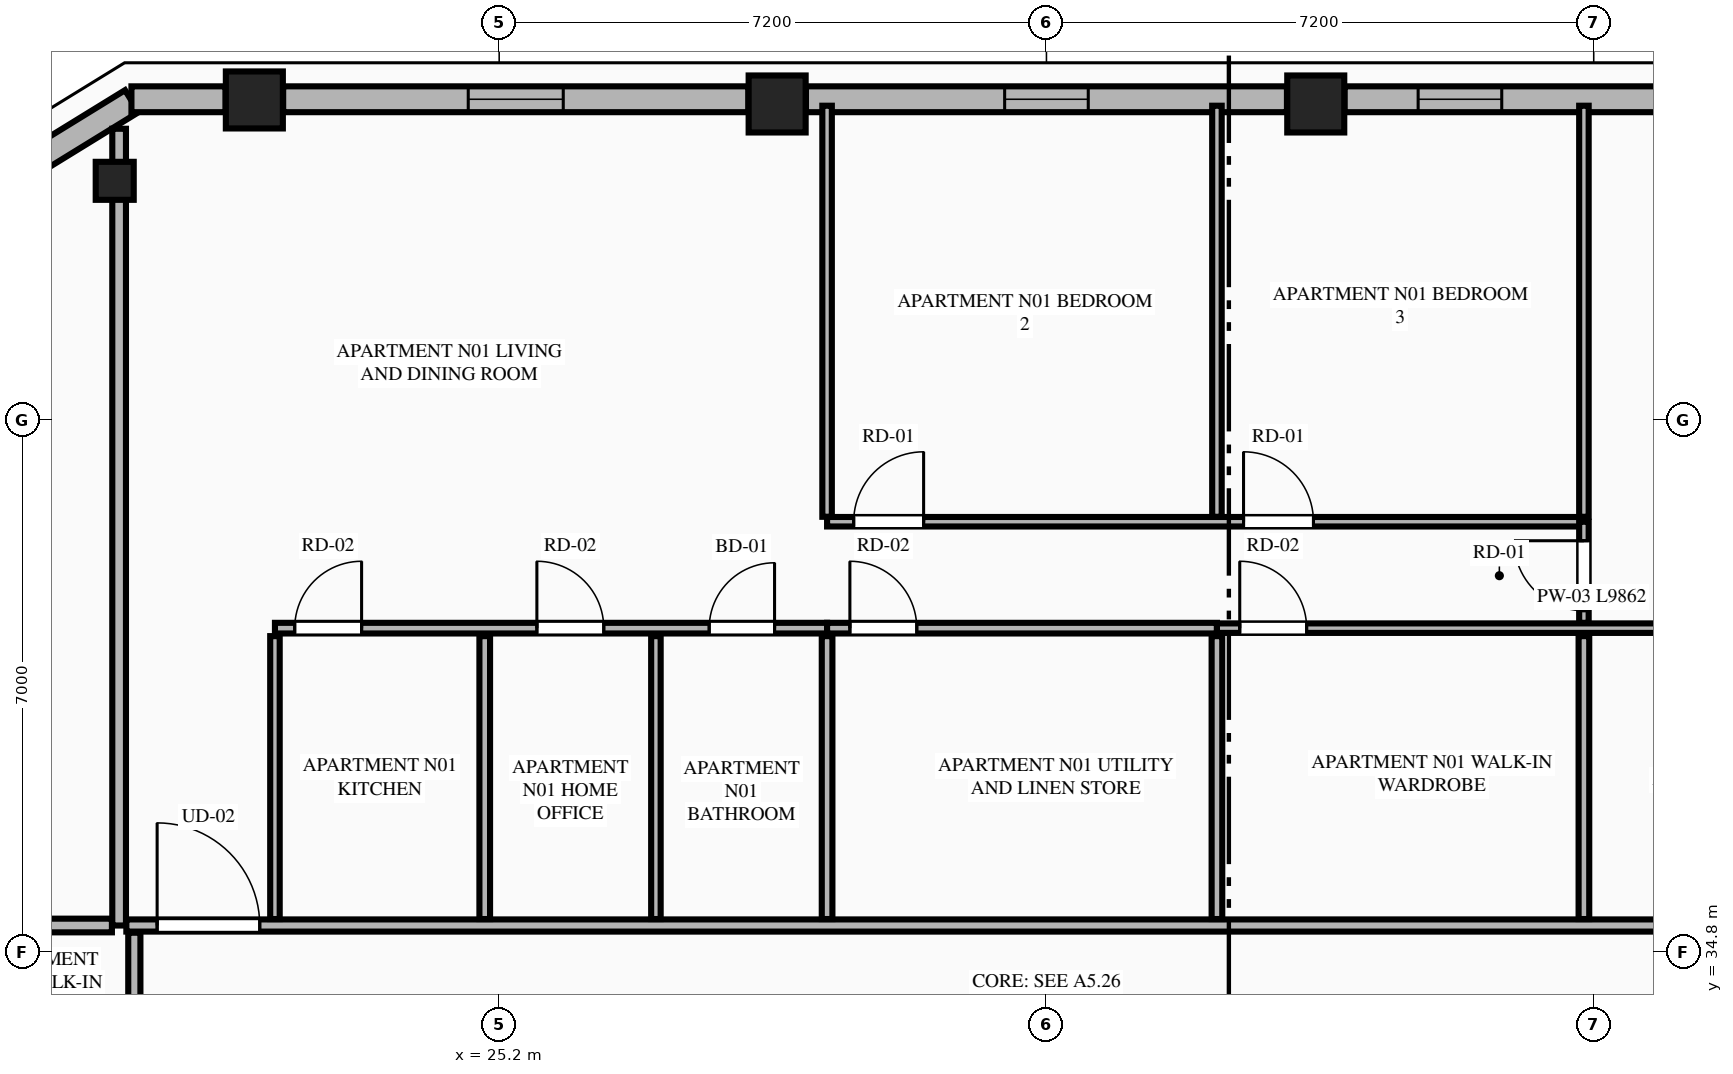
"""IFC4 building model, lengths in metres.
Left out: names, types, materials, properties, quantities, classifications, styles, units other than length and angle.
Written with IfcOpenShell. Run it as: python <this file> out.ifc"""

import sys

from ifc_helpers import new_model, si_unit, direction, frame, frame_2d, origin, origin_2d, place, context, subcontext, project, spatial, rectangle, extrude, element, fill, save


model = new_model("IFC4")
c1 = context("Model", 3, precision=1e-05, world=origin(), true_north=direction((0.0, 1.0)))
c2 = subcontext(c1, "Body", "Model", "MODEL_VIEW")
j1 = project(units=[si_unit("LENGTHUNIT", "METRE"), si_unit("PLANEANGLEUNIT", "RADIAN")], contexts=[c1])
p1 = place(None, origin())
s1 = spatial("IfcSite", under=j1, at=p1, CompositionType="ELEMENT")
p2 = place(p1, origin())
s2 = spatial("IfcBuilding", under=s1, at=p2, CompositionType="ELEMENT")
p3 = place(p2, frame((0.0, 0.0, 210.95)))
s3 = spatial("IfcBuildingStorey", under=s2, at=p3, CompositionType="ELEMENT", Elevation=210.95)
for number, where, z_axis, x_axis in (
    (1, (35.943, 45.958, 0.0), (0.0, 0.0, 1.0), (1.0, 0.0, 0.0)),
    (2, (28.857, 45.958, 0.0), (0.0, 0.0, 1.0), (1.0, 0.0, 0.0)),
    (3, (21.979, 46.011, 0.0), (0.0, 0.0, 1.0), (1.0, 0.0, 0.0)),
):
    element("IfcColumn", number, at=place(p3, frame(where, z_axis=z_axis, x_axis=x_axis)), inside=s3, PredefinedType="COLUMN", context=c2, shape_type="SweptSolid", body=[
        extrude(rectangle(XDim=0.75, YDim=0.75, at=origin_2d()), origin(), (0.0, 0.0, 1.0), 3.55),
    ])
p4 = place(p3, frame((20.142, 44.947, 0.0), z_axis=(0.0, 0.0, 1.0), x_axis=(-0.865230187018, -0.501374833306, 0.0)))
e4 = element("IfcColumn", 4, at=p4, inside=s3, PredefinedType="PILASTER", context=c2, shape_type="SweptSolid", body=[
    extrude(rectangle(XDim=0.5, YDim=0.35, at=origin_2d()), origin(), (0.0, 0.0, 1.0), 3.55),
])
p5 = place(p3, frame((20.367, 45.995, 0.0), z_axis=(0.0, 0.0, 1.0), x_axis=(-0.851713271379, -0.524008113828, 0.0)))
e5 = element("IfcWall", 5, at=p5, inside=s3, PredefinedType="STANDARD", context=c2, shape_type="SweptSolid", body=[
    extrude(rectangle(XDim=1.678, YDim=0.34, at=frame_2d((0.839, 0.0))), origin(), (0.0, 0.0, 1.0), 3.35),
])
p6 = place(p3, frame((42.442, 46.02, 0.0), z_axis=(0.0, 0.0, 1.0), x_axis=(-1.0, 0.0, 0.0)))
e6 = element("IfcWall", 6, at=p6, inside=s3, PredefinedType="STANDARD", context=c2, shape_type="SweptSolid", body=[
    extrude(rectangle(XDim=6.12, YDim=0.34, at=frame_2d((3.06, 0.0))), origin(), (0.0, 0.0, 1.0), 2.883),
])
p7 = place(p6, frame((0.879, 0.0, 0.75)))
e7 = element("IfcOpeningElement", 7, at=p7, cuts=e6, PredefinedType="OPENING", context=c2, shape_type="SweptSolid", body=[
    extrude(rectangle(XDim=1.1, YDim=1.983, at=frame_2d((0.55, 0.991))), frame((0.0, 0.18, 0.0), z_axis=(0.0, -1.0, 0.0), x_axis=(1.0, 0.0, 0.0)), (0.0, 0.0, 1.0), 0.36),
])
p8 = place(p6, frame((4.052, 0.0, 0.75)))
e8 = element("IfcOpeningElement", 8, at=p8, cuts=e6, PredefinedType="OPENING", context=c2, shape_type="SweptSolid", body=[
    extrude(rectangle(XDim=1.1, YDim=1.983, at=frame_2d((0.55, 0.991))), frame((0.0, 0.18, 0.0), z_axis=(0.0, -1.0, 0.0), x_axis=(1.0, 0.0, 0.0)), (0.0, 0.0, 1.0), 0.36),
])
p9 = place(p3, frame((35.564, 46.02, 0.0), z_axis=(0.0, 0.0, 1.0), x_axis=(-1.0, 0.0, 0.0)))
e9 = element("IfcWall", 9, at=p9, inside=s3, PredefinedType="STANDARD", context=c2, shape_type="SweptSolid", body=[
    extrude(rectangle(XDim=6.328, YDim=0.34, at=frame_2d((3.164, 0.0))), origin(), (0.0, 0.0, 1.0), 2.883),
])
p10 = place(p9, frame((2.614, 0.0, 0.75)))
e10 = element("IfcOpeningElement", 10, at=p10, cuts=e9, PredefinedType="OPENING", context=c2, shape_type="SweptSolid", body=[
    extrude(rectangle(XDim=1.1, YDim=1.983, at=frame_2d((0.55, 0.991))), frame((0.0, 0.18, 0.0), z_axis=(0.0, -1.0, 0.0), x_axis=(1.0, 0.0, 0.0)), (0.0, 0.0, 1.0), 0.36),
])
p11 = place(p3, frame((28.478, 46.02, 0.0), z_axis=(0.0, 0.0, 1.0), x_axis=(-1.0, 0.0, 0.0)))
e11 = element("IfcWall", 11, at=p11, inside=s3, PredefinedType="STANDARD", context=c2, shape_type="SweptSolid", body=[
    extrude(rectangle(XDim=6.12, YDim=0.34, at=frame_2d((3.06, 0.0))), origin(), (0.0, 0.0, 1.0), 2.883),
])
p12 = place(p11, frame((2.435, 0.0, 0.75)))
e12 = element("IfcOpeningElement", 12, at=p12, cuts=e11, PredefinedType="OPENING", context=c2, shape_type="SweptSolid", body=[
    extrude(rectangle(XDim=1.25, YDim=1.95, at=frame_2d((0.625, 0.975))), frame((0.0, 0.18, 0.0), z_axis=(0.0, -1.0, 0.0), x_axis=(1.0, 0.0, 0.0)), (0.0, 0.0, 1.0), 0.36),
])
p13 = place(p3, frame((21.6, 46.02, 0.0), z_axis=(0.0, 0.0, 1.0), x_axis=(-1.0, 0.0, 0.0)))
e13 = element("IfcWall", 13, at=p13, inside=s3, PredefinedType="STANDARD", context=c2, shape_type="SweptSolid", body=[
    extrude(rectangle(XDim=1.238, YDim=0.34, at=frame_2d((0.619, 0.0))), origin(), (0.0, 0.0, 1.0), 3.35),
])
p14 = place(p3, frame((20.2, 35.15, 0.0), z_axis=(0.0, 0.0, 1.0), x_axis=(0.0, 1.0, 0.0)))
e14 = element("IfcWall", 14, at=p14, inside=s3, PredefinedType="PARTITIONING", context=c2, shape_type="SweptSolid", body=[
    extrude(rectangle(XDim=10.482, YDim=0.18, at=frame_2d((5.241, 0.0))), origin(), (0.0, 0.0, 1.0), 3.35),
])
p15 = place(p3, frame((20.295, 35.15, 0.0), z_axis=(0.0, 0.0, 1.0), x_axis=(1.0, 0.0, 0.0)))
e15 = element("IfcWall", 15, at=p15, inside=s3, PredefinedType="PARTITIONING", context=c2, shape_type="SweptSolid", body=[
    extrude(rectangle(XDim=24.21, YDim=0.16, at=frame_2d((12.105, 0.0))), origin(), (0.0, 0.0, 1.0), 3.35),
])
p16 = place(p15, frame((0.405, 0.0, 0.0)))
e16 = element("IfcOpeningElement", 16, at=p16, cuts=e15, PredefinedType="OPENING", context=c2, shape_type="SweptSolid", body=[
    extrude(rectangle(XDim=1.35, YDim=2.35, at=frame_2d((0.675, 1.175))), frame((0.0, 0.09, 0.0), z_axis=(0.0, -1.0, 0.0), x_axis=(1.0, 0.0, 0.0)), (0.0, 0.0, 1.0), 0.18),
])
p17 = place(p3, frame((22.25, 35.235, 0.0), z_axis=(0.0, 0.0, 1.0), x_axis=(0.0, 1.0, 0.0)))
e17 = element("IfcWall", 17, at=p17, inside=s3, PredefinedType="PARTITIONING", context=c2, shape_type="SweptSolid", body=[
    extrude(rectangle(XDim=3.722, YDim=0.125, at=frame_2d((1.861, 0.0))), origin(), (0.0, 0.0, 1.0), 2.807),
])
p18 = place(p3, frame((22.25, 39.062, 0.0), z_axis=(0.0, 0.0, 1.0), x_axis=(1.0, 0.0, 0.0)))
e18 = element("IfcWall", 18, at=p18, inside=s3, PredefinedType="PLUMBINGWALL", context=c2, shape_type="SweptSolid", body=[
    extrude(rectangle(XDim=7.264, YDim=0.14, at=frame_2d((3.632, 0.0))), origin(), (0.0, 0.0, 1.0), 3.35),
])
p19 = place(p18, frame((5.713, 0.0, 0.0)))
e19 = element("IfcOpeningElement", 19, at=p19, cuts=e18, PredefinedType="OPENING", context=c2, shape_type="SweptSolid", body=[
    extrude(rectangle(XDim=0.86, YDim=2.1, at=frame_2d((0.43, 1.05))), frame((0.0, 0.08, 0.0), z_axis=(0.0, -1.0, 0.0), x_axis=(1.0, 0.0, 0.0)), (0.0, 0.0, 1.0), 0.16),
])
p20 = place(p18, frame((0.26, 0.0, 0.0)))
e20 = element("IfcOpeningElement", 20, at=p20, cuts=e18, PredefinedType="OPENING", context=c2, shape_type="SweptSolid", body=[
    extrude(rectangle(XDim=0.88, YDim=2.15, at=frame_2d((0.44, 1.075))), frame((0.0, 0.08, 0.0), z_axis=(0.0, -1.0, 0.0), x_axis=(1.0, 0.0, 0.0)), (0.0, 0.0, 1.0), 0.16),
])
p21 = place(p18, frame((3.446, 0.0, 0.0)))
e21 = element("IfcOpeningElement", 21, at=p21, cuts=e18, PredefinedType="OPENING", context=c2, shape_type="SweptSolid", body=[
    extrude(rectangle(XDim=0.88, YDim=2.15, at=frame_2d((0.44, 1.075))), frame((0.0, 0.08, 0.0), z_axis=(0.0, -1.0, 0.0), x_axis=(1.0, 0.0, 0.0)), (0.0, 0.0, 1.0), 0.16),
])
p22 = place(p3, frame((29.514, 39.062, 0.0), z_axis=(0.0, 0.0, 1.0), x_axis=(1.0, 0.0, 0.0)))
e22 = element("IfcWall", 22, at=p22, inside=s3, PredefinedType="PLUMBINGWALL", context=c2, shape_type="SweptSolid", body=[
    extrude(rectangle(XDim=5.129, YDim=0.14, at=frame_2d((2.564, 0.0))), origin(), (0.0, 0.0, 1.0), 3.35),
])
p23 = place(p22, frame((0.3, 0.0, 0.0)))
e23 = element("IfcOpeningElement", 23, at=p23, cuts=e22, PredefinedType="OPENING", context=c2, shape_type="SweptSolid", body=[
    extrude(rectangle(XDim=0.88, YDim=2.15, at=frame_2d((0.44, 1.075))), frame((0.0, 0.08, 0.0), z_axis=(0.0, -1.0, 0.0), x_axis=(1.0, 0.0, 0.0)), (0.0, 0.0, 1.0), 0.16),
])
p24 = place(p3, frame((34.643, 39.062, 0.0), z_axis=(0.0, 0.0, 1.0), x_axis=(1.0, 0.0, 0.0)))
e24 = element("IfcWall", 24, at=p24, inside=s3, PredefinedType="PARTITIONING", context=c2, shape_type="SweptSolid", body=[
    extrude(rectangle(XDim=9.862, YDim=0.125, at=frame_2d((4.931, 0.0))), origin(), (0.0, 0.0, 1.0), 3.35),
])
p25 = place(p24, frame((6.92, 0.0, 0.0)))
e25 = element("IfcOpeningElement", 25, at=p25, cuts=e24, PredefinedType="OPENING", context=c2, shape_type="SweptSolid", body=[
    extrude(rectangle(XDim=0.86, YDim=2.1, at=frame_2d((0.43, 1.05))), frame((0.0, 0.073, 0.0), z_axis=(0.0, -1.0, 0.0), x_axis=(1.0, 0.0, 0.0)), (0.0, 0.0, 1.0), 0.145),
])
p26 = place(p24, frame((0.3, 0.0, 0.0)))
e26 = element("IfcOpeningElement", 26, at=p26, cuts=e24, PredefinedType="OPENING", context=c2, shape_type="SweptSolid", body=[
    extrude(rectangle(XDim=0.88, YDim=2.15, at=frame_2d((0.44, 1.075))), frame((0.0, 0.073, 0.0), z_axis=(0.0, -1.0, 0.0), x_axis=(1.0, 0.0, 0.0)), (0.0, 0.0, 1.0), 0.145),
])
p27 = place(p3, frame((25.01, 35.235, 0.0), z_axis=(0.0, 0.0, 1.0), x_axis=(0.0, 1.0, 0.0)))
e27 = element("IfcWall", 27, at=p27, inside=s3, PredefinedType="PLUMBINGWALL", context=c2, shape_type="SweptSolid", body=[
    extrude(rectangle(XDim=3.722, YDim=0.14, at=frame_2d((1.861, 0.0))), origin(), (0.0, 0.0, 1.0), 3.35),
])
p28 = place(p3, frame((27.262, 35.235, 0.0), z_axis=(0.0, 0.0, 1.0), x_axis=(0.0, 1.0, 0.0)))
e28 = element("IfcWall", 28, at=p28, inside=s3, PredefinedType="PARTITIONING", context=c2, shape_type="SweptSolid", body=[
    extrude(rectangle(XDim=3.722, YDim=0.125, at=frame_2d((1.861, 0.0))), origin(), (0.0, 0.0, 1.0), 3.35),
])
p29 = place(p3, frame((29.514, 40.527, 0.0), z_axis=(0.0, 0.0, 1.0), x_axis=(0.0, 1.0, 0.0)))
e29 = element("IfcWall", 29, at=p29, inside=s3, PredefinedType="PARTITIONING", context=c2, shape_type="SweptSolid", body=[
    extrude(rectangle(XDim=5.408, YDim=0.125, at=frame_2d((2.704, 0.0))), origin(), (0.0, 0.0, 1.0), 3.35),
])
p30 = place(p3, frame((29.514, 40.462, 0.0), z_axis=(0.0, 0.0, 1.0), x_axis=(1.0, 0.0, 0.0)))
e30 = element("IfcWall", 30, at=p30, inside=s3, PredefinedType="PARTITIONING", context=c2, shape_type="SweptSolid", body=[
    extrude(rectangle(XDim=9.957, YDim=0.125, at=frame_2d((4.979, 0.0))), origin(), (0.0, 0.0, 1.0), 3.35),
])
p31 = place(p30, frame((0.35, 0.0, 0.0)))
e31 = element("IfcOpeningElement", 31, at=p31, cuts=e30, PredefinedType="OPENING", context=c2, shape_type="SweptSolid", body=[
    extrude(rectangle(XDim=0.92, YDim=2.15, at=frame_2d((0.46, 1.075))), frame((0.0, 0.073, 0.0), z_axis=(0.0, -1.0, 0.0), x_axis=(1.0, 0.0, 0.0)), (0.0, 0.0, 1.0), 0.145),
])
p32 = place(p30, frame((5.479, 0.0, 0.0)))
e32 = element("IfcOpeningElement", 32, at=p32, cuts=e30, PredefinedType="OPENING", context=c2, shape_type="SweptSolid", body=[
    extrude(rectangle(XDim=0.92, YDim=2.15, at=frame_2d((0.46, 1.075))), frame((0.0, 0.073, 0.0), z_axis=(0.0, -1.0, 0.0), x_axis=(1.0, 0.0, 0.0)), (0.0, 0.0, 1.0), 0.145),
])
p33 = place(p3, frame((39.471, 39.132, 0.0), z_axis=(0.0, 0.0, 1.0), x_axis=(0.0, 1.0, 0.0)))
e33 = element("IfcWall", 33, at=p33, inside=s3, PredefinedType="PARTITIONING", context=c2, shape_type="SweptSolid", body=[
    extrude(rectangle(XDim=1.33, YDim=0.125, at=frame_2d((0.665, 0.0))), origin(), (0.0, 0.0, 1.0), 3.35),
])
p34 = place(p33, frame((0.16, 0.0, 0.0)))
e34 = element("IfcOpeningElement", 34, at=p34, cuts=e33, PredefinedType="OPENING", context=c2, shape_type="SweptSolid", body=[
    extrude(rectangle(XDim=0.92, YDim=2.15, at=frame_2d((0.46, 1.075))), frame((0.0, 0.073, 0.0), z_axis=(0.0, -1.0, 0.0), x_axis=(1.0, 0.0, 0.0)), (0.0, 0.0, 1.0), 0.145),
])
for number, where, z_axis, x_axis in (
    (35, (29.514, 35.235, 0.0), (0.0, 0.0, 1.0), (0.0, 1.0, 0.0)),
    (36, (34.643, 35.235, 0.0), (0.0, 0.0, 1.0), (0.0, 1.0, 0.0)),
):
    element("IfcWall", number, at=place(p3, frame(where, z_axis=z_axis, x_axis=x_axis)), inside=s3, PredefinedType="PLUMBINGWALL", context=c2, shape_type="SweptSolid", body=[
        extrude(rectangle(XDim=3.722, YDim=0.14, at=frame_2d((1.861, 0.0))), origin(), (0.0, 0.0, 1.0), 3.35),
    ])
for number, where, z_axis, x_axis in (
    (37, (34.643, 40.527, 0.0), (0.0, 0.0, 1.0), (0.0, 1.0, 0.0)),
    (38, (39.471, 40.527, 0.0), (0.0, 0.0, 1.0), (0.0, 1.0, 0.0)),
):
    element("IfcWall", number, at=place(p3, frame(where, z_axis=z_axis, x_axis=x_axis)), inside=s3, PredefinedType="PARTITIONING", context=c2, shape_type="SweptSolid", body=[
        extrude(rectangle(XDim=5.408, YDim=0.125, at=frame_2d((2.704, 0.0))), origin(), (0.0, 0.0, 1.0), 3.35),
    ])
p35 = place(p3, frame((39.471, 35.235, 0.0), z_axis=(0.0, 0.0, 1.0), x_axis=(0.0, 1.0, 0.0)))
e39 = element("IfcWall", 39, at=p35, inside=s3, PredefinedType="PLUMBINGWALL", context=c2, shape_type="SweptSolid", body=[
    extrude(rectangle(XDim=3.722, YDim=0.14, at=frame_2d((1.861, 0.0))), origin(), (0.0, 0.0, 1.0), 3.35),
])
p36 = place(p3, frame((14.11, 35.15, 0.0), z_axis=(0.0, 0.0, 1.0), x_axis=(1.0, 0.0, 0.0)))
e40 = element("IfcWall", 40, at=p36, inside=s3, PredefinedType="PARTITIONING", context=c2, shape_type="SweptSolid", body=[
    extrude(rectangle(XDim=5.995, YDim=0.18, at=frame_2d((2.998, 0.0))), origin(), (0.0, 0.0, 1.0), 3.35),
])
p37 = place(p3, frame((20.4, 16.345, 0.0), z_axis=(0.0, 0.0, 1.0), x_axis=(0.0, 1.0, 0.0)))
e41 = element("IfcWall", 41, at=p37, inside=s3, PredefinedType="PARTITIONING", context=c2, shape_type="SweptSolid", body=[
    extrude(rectangle(XDim=18.71, YDim=0.16, at=frame_2d((9.355, 0.0))), origin(), (0.0, 0.0, 1.0), 3.35),
])
p38 = place(p37, frame((0.45, 0.0, 0.0)))
e42 = element("IfcOpeningElement", 42, at=p38, cuts=e41, PredefinedType="OPENING", context=c2, shape_type="SweptSolid", body=[
    extrude(rectangle(XDim=1.02, YDim=2.25, at=frame_2d((0.51, 1.125))), frame((0.0, 0.09, 0.0), z_axis=(0.0, -1.0, 0.0), x_axis=(1.0, 0.0, 0.0)), (0.0, 0.0, 1.0), 0.18),
])
p39 = place(p10, origin())
e43 = element("IfcWindow", 43, at=p39, inside=s3, PartitioningType="SINGLE_PANEL", PredefinedType="WINDOW", context=c2, shape_type="SweptSolid", body=[
    extrude(rectangle(XDim=1.1, YDim=1.983, at=frame_2d((0.55, 0.991))), frame((0.0, 0.03, 0.0), z_axis=(0.0, -1.0, 0.0), x_axis=(1.0, 0.0, 0.0)), (0.0, 0.0, 1.0), 0.06),
])
fill(e10, e43)
p40 = place(p12, origin())
e44 = element("IfcWindow", 44, at=p40, inside=s3, PartitioningType="SINGLE_PANEL", PredefinedType="WINDOW", context=c2, shape_type="SweptSolid", body=[
    extrude(rectangle(XDim=1.25, YDim=1.95, at=frame_2d((0.625, 0.975))), frame((0.0, 0.03, 0.0), z_axis=(0.0, -1.0, 0.0), x_axis=(1.0, 0.0, 0.0)), (0.0, 0.0, 1.0), 0.06),
])
fill(e12, e44)
p41 = place(p19, origin())
e45 = element("IfcDoor", 45, at=p41, inside=s3, OperationType="SINGLE_SWING_RIGHT", PredefinedType="DOOR", context=c2, shape_type="SweptSolid", body=[
    extrude(rectangle(XDim=0.86, YDim=2.1, at=frame_2d((0.43, 1.05))), frame((0.0, 0.025, 0.0), z_axis=(0.0, -1.0, 0.0), x_axis=(1.0, 0.0, 0.0)), (0.0, 0.0, 1.0), 0.05),
])
fill(e19, e45)
p42 = place(p16, origin())
e46 = element("IfcDoor", 46, at=p42, inside=s3, OperationType="SINGLE_SWING_LEFT", PredefinedType="DOOR", context=c2, shape_type="SweptSolid", body=[
    extrude(rectangle(XDim=1.35, YDim=2.35, at=frame_2d((0.675, 1.175))), frame((0.0, 0.025, 0.0), z_axis=(0.0, -1.0, 0.0), x_axis=(1.0, 0.0, 0.0)), (0.0, 0.0, 1.0), 0.05),
])
fill(e16, e46)
p43 = place(p20, origin())
e47 = element("IfcDoor", 47, at=p43, inside=s3, OperationType="SINGLE_SWING_RIGHT", PredefinedType="DOOR", context=c2, shape_type="SweptSolid", body=[
    extrude(rectangle(XDim=0.88, YDim=2.15, at=frame_2d((0.44, 1.075))), frame((0.0, 0.025, 0.0), z_axis=(0.0, -1.0, 0.0), x_axis=(1.0, 0.0, 0.0)), (0.0, 0.0, 1.0), 0.05),
])
fill(e20, e47)
p44 = place(p21, origin())
e48 = element("IfcDoor", 48, at=p44, inside=s3, OperationType="SINGLE_SWING_LEFT", PredefinedType="DOOR", context=c2, shape_type="SweptSolid", body=[
    extrude(rectangle(XDim=0.88, YDim=2.15, at=frame_2d((0.44, 1.075))), frame((0.0, 0.025, 0.0), z_axis=(0.0, -1.0, 0.0), x_axis=(1.0, 0.0, 0.0)), (0.0, 0.0, 1.0), 0.05),
])
fill(e21, e48)
p45 = place(p23, origin())
e49 = element("IfcDoor", 49, at=p45, inside=s3, OperationType="SINGLE_SWING_LEFT", PredefinedType="DOOR", context=c2, shape_type="SweptSolid", body=[
    extrude(rectangle(XDim=0.88, YDim=2.15, at=frame_2d((0.44, 1.075))), frame((0.0, 0.025, 0.0), z_axis=(0.0, -1.0, 0.0), x_axis=(1.0, 0.0, 0.0)), (0.0, 0.0, 1.0), 0.05),
])
fill(e23, e49)
p46 = place(p31, origin())
e50 = element("IfcDoor", 50, at=p46, inside=s3, OperationType="SINGLE_SWING_RIGHT", PredefinedType="DOOR", context=c2, shape_type="SweptSolid", body=[
    extrude(rectangle(XDim=0.92, YDim=2.15, at=frame_2d((0.46, 1.075))), frame((0.0, 0.025, 0.0), z_axis=(0.0, -1.0, 0.0), x_axis=(1.0, 0.0, 0.0)), (0.0, 0.0, 1.0), 0.05),
])
fill(e31, e50)
p47 = place(p32, origin())
e51 = element("IfcDoor", 51, at=p47, inside=s3, OperationType="SINGLE_SWING_LEFT", PredefinedType="DOOR", context=c2, shape_type="SweptSolid", body=[
    extrude(rectangle(XDim=0.92, YDim=2.15, at=frame_2d((0.46, 1.075))), frame((0.0, 0.025, 0.0), z_axis=(0.0, -1.0, 0.0), x_axis=(1.0, 0.0, 0.0)), (0.0, 0.0, 1.0), 0.05),
])
fill(e32, e51)
p48 = place(p34, origin())
e52 = element("IfcDoor", 52, at=p48, inside=s3, OperationType="SINGLE_SWING_RIGHT", PredefinedType="DOOR", context=c2, shape_type="SweptSolid", body=[
    extrude(rectangle(XDim=0.92, YDim=2.15, at=frame_2d((0.46, 1.075))), frame((0.0, 0.025, 0.0), z_axis=(0.0, -1.0, 0.0), x_axis=(1.0, 0.0, 0.0)), (0.0, 0.0, 1.0), 0.05),
])
fill(e34, e52)
p49 = place(p26, origin())
e53 = element("IfcDoor", 53, at=p49, inside=s3, OperationType="SINGLE_SWING_LEFT", PredefinedType="DOOR", context=c2, shape_type="SweptSolid", body=[
    extrude(rectangle(XDim=0.88, YDim=2.15, at=frame_2d((0.44, 1.075))), frame((0.0, 0.025, 0.0), z_axis=(0.0, -1.0, 0.0), x_axis=(1.0, 0.0, 0.0)), (0.0, 0.0, 1.0), 0.05),
])
fill(e26, e53)
p50 = place(p8, origin())
e54 = element("IfcWindow", 54, at=p50, inside=s3, PartitioningType="SINGLE_PANEL", PredefinedType="WINDOW", context=c2, shape_type="SweptSolid", body=[
    extrude(rectangle(XDim=1.1, YDim=1.983, at=frame_2d((0.55, 0.991))), frame((0.0, 0.03, 0.0), z_axis=(0.0, -1.0, 0.0), x_axis=(1.0, 0.0, 0.0)), (0.0, 0.0, 1.0), 0.06),
])
fill(e8, e54)
save(model, sys.argv[1])
